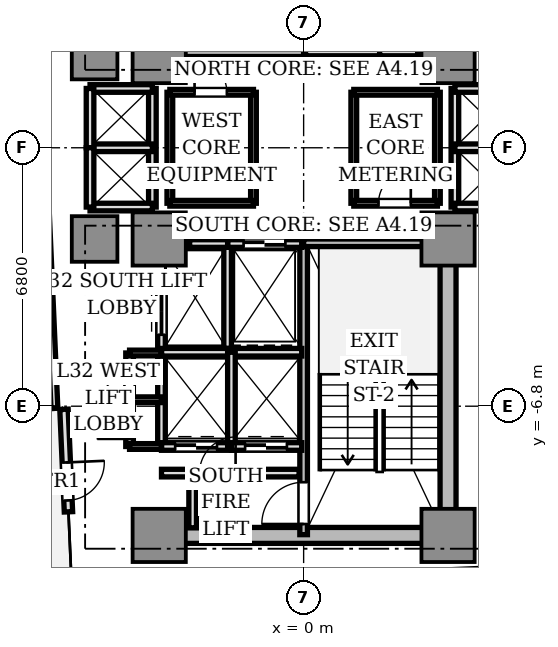
"""IFC4 building model, lengths in metres.
Left out: names, types, materials, properties, quantities, classifications, styles, units other than length and angle.
Written with IfcOpenShell. Run it as: python <this file> out.ifc"""

import sys

from ifc_helpers import new_model, si_unit, direction, frame, frame_2d, origin, origin_2d, place, context, subcontext, project, spatial, rectangle, extrude, source, transform, mapped, element, fill, save


model = new_model("IFC4")
c1 = context("Model", 3, precision=1e-05, world=origin(), true_north=direction((0.0, 1.0)))
c2 = subcontext(c1, "Body", "Model", "MODEL_VIEW")
j1 = project(units=[si_unit("LENGTHUNIT", "METRE"), si_unit("PLANEANGLEUNIT", "RADIAN")], contexts=[c1])
p1 = place(None, origin())
s1 = spatial("IfcSite", under=j1, at=p1, CompositionType="ELEMENT")
p2 = place(p1, origin())
s2 = spatial("IfcBuilding", under=s1, at=p2, CompositionType="ELEMENT")
p3 = place(p2, frame((0.0, 0.0, 118.15)))
s3 = spatial("IfcBuildingStorey", under=s2, at=p3, CompositionType="ELEMENT", Elevation=118.15)
p4 = place(p3, frame((-3.55, -10.2, 0.0), z_axis=(0.0, 0.0, 1.0), x_axis=(1.0, 0.0, 0.0)))
e1 = element("IfcWall", 1, at=p4, inside=s3, PredefinedType="SHEAR", context=c2, shape_type="SweptSolid", body=[
    extrude(rectangle(XDim=7.1, YDim=0.42, at=frame_2d((3.55, 0.0))), origin(), (0.0, 0.0, 1.0), 3.11),
])
p5 = place(p3, frame((3.8, -9.75, 0.0), z_axis=(0.0, 0.0, 1.0), x_axis=(0.0, 1.0, 0.0)))
e2 = element("IfcWall", 2, at=p5, inside=s3, PredefinedType="SHEAR", context=c2, shape_type="SweptSolid", body=[
    extrude(rectangle(XDim=6.9, YDim=0.42, at=frame_2d((3.45, 0.0))), origin(), (0.0, 0.0, 1.0), 3.11),
])
m1 = source(origin(), c2, "Body", "SweptSolid", [
    extrude(rectangle(XDim=1.4, YDim=1.4, at=origin_2d()), origin(), (0.0, 0.0, 1.0), 3.11),
])
for number, where, z_axis, x_axis in (
    (3, (-3.8, 2.4, 0.0), (0.0, 0.0, 1.0), (1.0, 0.0, 0.0)),
    (4, (3.8, 2.4, 0.0), (0.0, 0.0, 1.0), (1.0, 0.0, 0.0)),
    (5, (-3.8, -2.4, 0.0), (0.0, 0.0, 1.0), (1.0, 0.0, 0.0)),
    (6, (3.8, -2.4, 0.0), (0.0, 0.0, 1.0), (1.0, 0.0, 0.0)),
    (7, (-3.8, -10.2, 0.0), (0.0, 0.0, 1.0), (1.0, 0.0, 0.0)),
    (8, (3.8, -10.2, 0.0), (0.0, 0.0, 1.0), (1.0, 0.0, 0.0)),
):
    element("IfcColumn", number, at=place(p3, frame(where, z_axis=z_axis, x_axis=x_axis)), inside=s3, PredefinedType="COLUMN", context=c2, shape_type="MappedRepresentation", body=[
        mapped(m1, transform((0.0, 0.0, 0.0), scale=1.0)),
    ])
m2 = source(origin(), c2, "Body", "SweptSolid", [
    extrude(rectangle(XDim=1.2, YDim=1.2, at=origin_2d()), origin(), (0.0, 0.0, 1.0), 3.11),
])
for number, where, z_axis, x_axis in (
    (9, (-5.5, 2.4, 0.0), (0.0, 0.0, 1.0), (1.0, 0.0, 0.0)),
    (10, (-5.5, -2.4, 0.0), (0.0, 0.0, 1.0), (1.0, 0.0, 0.0)),
):
    element("IfcColumn", number, at=place(p3, frame(where, z_axis=z_axis, x_axis=x_axis)), inside=s3, PredefinedType="COLUMN", context=c2, shape_type="MappedRepresentation", body=[
        mapped(m2, transform((0.0, 0.0, 0.0), scale=1.0)),
    ])
p6 = place(p3, frame((-6.306, -6.882, 0.0), z_axis=(0.0, 0.0, 1.0), x_axis=(0.043672655174, -0.999045894436, 0.0)))
e11 = element("IfcWall", 11, at=p6, inside=s3, PredefinedType="STANDARD", context=c2, shape_type="SweptSolid", body=[
    extrude(rectangle(XDim=2.7, YDim=0.22, at=frame_2d((1.35, 0.0))), origin(), (0.0, 0.0, 1.0), 3.11),
])
p7 = place(p6, frame((1.4, 0.0, 0.0)))
e12 = element("IfcOpeningElement", 12, at=p7, cuts=e11, PredefinedType="OPENING", context=c2, shape_type="SweptSolid", body=[
    extrude(rectangle(XDim=1.0, YDim=2.2, at=frame_2d((0.5, 1.1))), frame((0.0, 0.12, 0.0), z_axis=(0.0, -1.0, 0.0), x_axis=(1.0, 0.0, 0.0)), (0.0, 0.0, 1.0), 0.24),
])
p8 = place(p3, frame((0.0, 2.5, 0.0), z_axis=(0.0, 0.0, 1.0), x_axis=(0.0, 1.0, 0.0)))
e13 = element("IfcWall", 13, at=p8, inside=s3, PredefinedType="SOLIDWALL", context=c2, shape_type="SweptSolid", body=[
    extrude(rectangle(XDim=7.68, YDim=0.2, at=frame_2d((3.84, 0.0))), origin(), (0.0, 0.0, 1.0), 3.11),
])
p9 = place(p8, frame((6.36, 0.0, 0.0)))
e14 = element("IfcOpeningElement", 14, at=p9, cuts=e13, PredefinedType="OPENING", context=c2, shape_type="SweptSolid", body=[
    extrude(rectangle(XDim=1.1, YDim=2.15, at=frame_2d((0.55, 1.075))), frame((0.0, 0.11, 0.0), z_axis=(0.0, -1.0, 0.0), x_axis=(1.0, 0.0, 0.0)), (0.0, 0.0, 1.0), 0.22),
])
p10 = place(p3, frame((-3.72, 2.5, 0.0), z_axis=(0.0, 0.0, 1.0), x_axis=(1.0, 0.0, 0.0)))
e15 = element("IfcWall", 15, at=p10, inside=s3, PredefinedType="SOLIDWALL", context=c2, shape_type="SweptSolid", body=[
    extrude(rectangle(XDim=3.72, YDim=0.2, at=frame_2d((1.86, 0.0))), origin(), (0.0, 0.0, 1.0), 3.11),
])
p11 = place(p3, frame((0.0, -10.18, 0.0), z_axis=(0.0, 0.0, 1.0), x_axis=(0.0, 1.0, 0.0)))
e16 = element("IfcWall", 16, at=p11, inside=s3, PredefinedType="SOLIDWALL", context=c2, shape_type="SweptSolid", body=[
    extrude(rectangle(XDim=7.68, YDim=0.2, at=frame_2d((3.84, 0.0))), origin(), (0.0, 0.0, 1.0), 3.11),
])
p12 = place(p11, frame((0.28, 0.0, 0.0)))
e17 = element("IfcOpeningElement", 17, at=p12, cuts=e16, PredefinedType="OPENING", context=c2, shape_type="SweptSolid", body=[
    extrude(rectangle(XDim=1.1, YDim=2.15, at=frame_2d((0.55, 1.075))), frame((0.0, 0.11, 0.0), z_axis=(0.0, -1.0, 0.0), x_axis=(1.0, 0.0, 0.0)), (0.0, 0.0, 1.0), 0.22),
])
p13 = place(p3, frame((0.0, -2.5, 0.0), z_axis=(0.0, 0.0, 1.0), x_axis=(1.0, 0.0, 0.0)))
e18 = element("IfcWall", 18, at=p13, inside=s3, PredefinedType="SOLIDWALL", context=c2, shape_type="SweptSolid", body=[
    extrude(rectangle(XDim=3.72, YDim=0.2, at=frame_2d((1.86, 0.0))), origin(), (0.0, 0.0, 1.0), 3.11),
])
p14 = place(p3, frame((2.0, 2.5, 0.0), z_axis=(0.0, 0.0, 1.0), x_axis=(0.0, 1.0, 0.0)))
e19 = element("IfcWall", 19, at=p14, inside=s3, PredefinedType="SOLIDWALL", context=c2, shape_type="SweptSolid", body=[
    extrude(rectangle(XDim=2.78, YDim=0.2, at=frame_2d((1.39, 0.0))), origin(), (0.0, 0.0, 1.0), 2.66),
])
p15 = place(p3, frame((0.05, 2.52, 0.0), z_axis=(0.0, 0.0, 1.0), x_axis=(1.0, 0.0, 0.0)))
e20 = element("IfcWall", 20, at=p15, inside=s3, PredefinedType="SOLIDWALL", context=c2, shape_type="SweptSolid", body=[
    extrude(rectangle(XDim=1.95, YDim=0.2, at=frame_2d((0.975, 0.0))), origin(), (0.0, 0.0, 1.0), 2.66),
])
p16 = place(p3, frame((-2.0, -5.28, 0.0), z_axis=(0.0, 0.0, 1.0), x_axis=(0.0, 1.0, 0.0)))
e21 = element("IfcWall", 21, at=p16, inside=s3, PredefinedType="SOLIDWALL", context=c2, shape_type="SweptSolid", body=[
    extrude(rectangle(XDim=2.78, YDim=0.2, at=frame_2d((1.39, 0.0))), origin(), (0.0, 0.0, 1.0), 2.66),
])
p17 = place(p3, frame((-2.0, -2.52, 0.0), z_axis=(0.0, 0.0, 1.0), x_axis=(1.0, 0.0, 0.0)))
e22 = element("IfcWall", 22, at=p17, inside=s3, PredefinedType="SOLIDWALL", context=c2, shape_type="SweptSolid", body=[
    extrude(rectangle(XDim=1.95, YDim=0.2, at=frame_2d((0.975, 0.0))), origin(), (0.0, 0.0, 1.0), 2.66),
])
p18 = place(p17, frame((0.42, 0.0, 0.0)))
e23 = element("IfcOpeningElement", 23, at=p18, cuts=e22, PredefinedType="OPENING", context=c2, shape_type="SweptSolid", body=[
    extrude(rectangle(XDim=1.1, YDim=2.2, at=frame_2d((0.55, 1.1))), frame((0.0, 0.11, 0.0), z_axis=(0.0, -1.0, 0.0), x_axis=(1.0, 0.0, 0.0)), (0.0, 0.0, 1.0), 0.22),
])
for number, where, z_axis, x_axis in (
    (24, (2.0, 2.52, 0.0), (0.0, 0.0, 1.0), (1.0, 0.0, 0.0)),
    (25, (-3.0, -2.52, 0.0), (0.0, 0.0, 1.0), (1.0, 0.0, 0.0)),
):
    element("IfcWall", number, at=place(p3, frame(where, z_axis=z_axis, x_axis=x_axis)), inside=s3, PredefinedType="SOLIDWALL", context=c2, shape_type="SweptSolid", body=[
        extrude(rectangle(XDim=1.0, YDim=0.2, at=frame_2d((0.5, 0.0))), origin(), (0.0, 0.0, 1.0), 2.66),
    ])
p19 = place(p3, frame((-3.74, -5.36, 0.0), z_axis=(0.0, 0.0, 1.0), x_axis=(0.0, 1.0, 0.0)))
e26 = element("IfcWall", 26, at=p19, inside=s3, PredefinedType="SOLIDWALL", context=c2, shape_type="SweptSolid", body=[
    extrude(rectangle(XDim=2.08, YDim=0.2, at=frame_2d((1.04, 0.0))), origin(), (0.0, 0.0, 1.0), 2.66),
])
p20 = place(p19, frame((0.44, 0.0, 0.0)))
e27 = element("IfcOpeningElement", 27, at=p20, cuts=e26, PredefinedType="OPENING", context=c2, shape_type="SweptSolid", body=[
    extrude(rectangle(XDim=1.2, YDim=2.2, at=frame_2d((0.6, 1.1))), frame((0.0, 0.11, 0.0), z_axis=(0.0, -1.0, 0.0), x_axis=(1.0, 0.0, 0.0)), (0.0, 0.0, 1.0), 0.22),
])
p21 = place(p3, frame((-3.74, -7.86, 0.0), z_axis=(0.0, 0.0, 1.0), x_axis=(0.0, 1.0, 0.0)))
e28 = element("IfcWall", 28, at=p21, inside=s3, PredefinedType="SOLIDWALL", context=c2, shape_type="SweptSolid", body=[
    extrude(rectangle(XDim=2.48, YDim=0.2, at=frame_2d((1.24, 0.0))), origin(), (0.0, 0.0, 1.0), 2.66),
])
p22 = place(p3, frame((-3.74, -7.86, 0.0), z_axis=(0.0, 0.0, 1.0), x_axis=(1.0, 0.0, 0.0)))
e29 = element("IfcWall", 29, at=p22, inside=s3, PredefinedType="SOLIDWALL", context=c2, shape_type="SweptSolid", body=[
    extrude(rectangle(XDim=1.84, YDim=0.2, at=frame_2d((0.92, 0.0))), origin(), (0.0, 0.0, 1.0), 2.66),
])
p23 = place(p22, frame((0.36, 0.0, 0.0)))
e30 = element("IfcOpeningElement", 30, at=p23, cuts=e29, PredefinedType="OPENING", context=c2, shape_type="SweptSolid", body=[
    extrude(rectangle(XDim=1.1, YDim=2.2, at=frame_2d((0.55, 1.1))), frame((0.0, 0.11, 0.0), z_axis=(0.0, -1.0, 0.0), x_axis=(1.0, 0.0, 0.0)), (0.0, 0.0, 1.0), 0.22),
])
p24 = place(p3, frame((-3.74, -5.38, 0.0), z_axis=(0.0, 0.0, 1.0), x_axis=(1.0, 0.0, 0.0)))
e31 = element("IfcWall", 31, at=p24, inside=s3, PredefinedType="SOLIDWALL", context=c2, shape_type="SweptSolid", body=[
    extrude(rectangle(XDim=3.69, YDim=0.2, at=frame_2d((1.845, 0.0))), origin(), (0.0, 0.0, 1.0), 2.66),
])
p25 = place(p3, frame((-1.9, -7.86, 0.0), z_axis=(0.0, 0.0, 1.0), x_axis=(0.0, 1.0, 0.0)))
e32 = element("IfcWall", 32, at=p25, inside=s3, PredefinedType="SOLIDWALL", context=c2, shape_type="SweptSolid", body=[
    extrude(rectangle(XDim=2.48, YDim=0.2, at=frame_2d((1.24, 0.0))), origin(), (0.0, 0.0, 1.0), 2.66),
])
p26 = place(p3, frame((-1.9, -7.86, 0.0), z_axis=(0.0, 0.0, 1.0), x_axis=(1.0, 0.0, 0.0)))
e33 = element("IfcWall", 33, at=p26, inside=s3, PredefinedType="SOLIDWALL", context=c2, shape_type="SweptSolid", body=[
    extrude(rectangle(XDim=1.85, YDim=0.2, at=frame_2d((0.925, 0.0))), origin(), (0.0, 0.0, 1.0), 2.66),
])
p27 = place(p26, frame((0.36, 0.0, 0.0)))
e34 = element("IfcOpeningElement", 34, at=p27, cuts=e33, PredefinedType="OPENING", context=c2, shape_type="SweptSolid", body=[
    extrude(rectangle(XDim=1.1, YDim=2.2, at=frame_2d((0.55, 1.1))), frame((0.0, 0.11, 0.0), z_axis=(0.0, -1.0, 0.0), x_axis=(1.0, 0.0, 0.0)), (0.0, 0.0, 1.0), 0.22),
])
p28 = place(p3, frame((3.98, -1.56, 0.0), z_axis=(0.0, 0.0, 1.0), x_axis=(0.0, 1.0, 0.0)))
e35 = element("IfcWall", 35, at=p28, inside=s3, PredefinedType="SOLIDWALL", context=c2, shape_type="SweptSolid", body=[
    extrude(rectangle(XDim=3.12, YDim=0.2, at=frame_2d((1.56, 0.0))), origin(), (0.0, 0.0, 1.0), 2.28),
])
for number, where, z_axis, x_axis in (
    (36, (3.98, 1.56, 0.0), (0.0, 0.0, 1.0), (1.0, 0.0, 0.0)),
    (37, (3.98, -1.56, 0.0), (0.0, 0.0, 1.0), (1.0, 0.0, 0.0)),
    (38, (3.98, 0.0, 0.0), (0.0, 0.0, 1.0), (1.0, 0.0, 0.0)),
):
    element("IfcWall", number, at=place(p3, frame(where, z_axis=z_axis, x_axis=x_axis)), inside=s3, PredefinedType="SOLIDWALL", context=c2, shape_type="SweptSolid", body=[
        extrude(rectangle(XDim=1.64, YDim=0.2, at=frame_2d((0.82, 0.0))), origin(), (0.0, 0.0, 1.0), 2.66),
    ])
p29 = place(p3, frame((-3.98, -1.56, 0.0), z_axis=(0.0, 0.0, 1.0), x_axis=(0.0, 1.0, 0.0)))
e39 = element("IfcWall", 39, at=p29, inside=s3, PredefinedType="SOLIDWALL", context=c2, shape_type="SweptSolid", body=[
    extrude(rectangle(XDim=3.12, YDim=0.2, at=frame_2d((1.56, 0.0))), origin(), (0.0, 0.0, 1.0), 2.28),
])
for number, where, z_axis, x_axis in (
    (40, (-5.62, 1.56, 0.0), (0.0, 0.0, 1.0), (1.0, 0.0, 0.0)),
    (41, (-5.62, -1.56, 0.0), (0.0, 0.0, 1.0), (1.0, 0.0, 0.0)),
    (42, (-5.62, 0.0, 0.0), (0.0, 0.0, 1.0), (1.0, 0.0, 0.0)),
):
    element("IfcWall", number, at=place(p3, frame(where, z_axis=z_axis, x_axis=x_axis)), inside=s3, PredefinedType="SOLIDWALL", context=c2, shape_type="SweptSolid", body=[
        extrude(rectangle(XDim=1.64, YDim=0.2, at=frame_2d((0.82, 0.0))), origin(), (0.0, 0.0, 1.0), 2.66),
    ])
for number, where, z_axis, x_axis in (
    (43, (-5.62, 0.0, 0.0), (0.0, 0.0, 1.0), (0.0, 1.0, 0.0)),
    (44, (-5.62, -1.56, 0.0), (0.0, 0.0, 1.0), (0.0, 1.0, 0.0)),
):
    element("IfcWall", number, at=place(p3, frame(where, z_axis=z_axis, x_axis=x_axis)), inside=s3, PredefinedType="SOLIDWALL", context=c2, shape_type="SweptSolid", body=[
        extrude(rectangle(XDim=1.56, YDim=0.2, at=frame_2d((0.78, 0.0))), origin(), (0.0, 0.0, 1.0), 2.66),
    ])
p30 = place(p3, frame((-3.74, -8.56, 0.0), z_axis=(0.0, 0.0, 1.0), x_axis=(1.0, 0.0, 0.0)))
e45 = element("IfcWall", 45, at=p30, inside=s3, PredefinedType="SOLIDWALL", context=c2, shape_type="SweptSolid", body=[
    extrude(rectangle(XDim=3.62, YDim=0.2, at=frame_2d((1.81, 0.0))), origin(), (0.0, 0.0, 1.0), 2.66),
])
p31 = place(p30, frame((1.0, 0.0, 0.0)))
e46 = element("IfcOpeningElement", 46, at=p31, cuts=e45, PredefinedType="OPENING", context=c2, shape_type="SweptSolid", body=[
    extrude(rectangle(XDim=0.95, YDim=2.15, at=frame_2d((0.475, 1.075))), frame((0.0, 0.11, 0.0), z_axis=(0.0, -1.0, 0.0), x_axis=(1.0, 0.0, 0.0)), (0.0, 0.0, 1.0), 0.22),
])
p32 = place(p3, frame((-2.92, -10.0, 0.0), z_axis=(0.0, 0.0, 1.0), x_axis=(0.0, 1.0, 0.0)))
e47 = element("IfcWall", 47, at=p32, inside=s3, PredefinedType="SOLIDWALL", context=c2, shape_type="SweptSolid", body=[
    extrude(rectangle(XDim=1.44, YDim=0.2, at=frame_2d((0.72, 0.0))), origin(), (0.0, 0.0, 1.0), 2.66),
])
p33 = place(p3, frame((-4.58, -7.86, 0.0), z_axis=(0.0, 0.0, 1.0), x_axis=(0.0, 1.0, 0.0)))
e48 = element("IfcWall", 48, at=p33, inside=s3, PredefinedType="SOLIDWALL", context=c2, shape_type="SweptSolid", body=[
    extrude(rectangle(XDim=2.46, YDim=0.2, at=frame_2d((1.23, 0.0))), origin(), (0.0, 0.0, 1.0), 2.66),
])
p34 = place(p33, frame((0.2, 0.0, 0.0)))
e49 = element("IfcOpeningElement", 49, at=p34, cuts=e48, PredefinedType="OPENING", context=c2, shape_type="SweptSolid", body=[
    extrude(rectangle(XDim=0.85, YDim=2.1, at=frame_2d((0.425, 1.05))), frame((0.0, 0.11, 0.0), z_axis=(0.0, -1.0, 0.0), x_axis=(1.0, 0.0, 0.0)), (0.0, 0.0, 1.0), 0.22),
])
p35 = place(p33, frame((1.38, 0.0, 0.0)))
e50 = element("IfcOpeningElement", 50, at=p35, cuts=e48, PredefinedType="OPENING", context=c2, shape_type="SweptSolid", body=[
    extrude(rectangle(XDim=0.85, YDim=2.1, at=frame_2d((0.425, 1.05))), frame((0.0, 0.11, 0.0), z_axis=(0.0, -1.0, 0.0), x_axis=(1.0, 0.0, 0.0)), (0.0, 0.0, 1.0), 0.22),
])
for number, where, z_axis, x_axis in (
    (51, (-4.58, -5.4, 0.0), (0.0, 0.0, 1.0), (1.0, 0.0, 0.0)),
    (52, (-4.58, -7.86, 0.0), (0.0, 0.0, 1.0), (1.0, 0.0, 0.0)),
    (53, (-4.58, -6.63, 0.0), (0.0, 0.0, 1.0), (1.0, 0.0, 0.0)),
):
    element("IfcWall", number, at=place(p3, frame(where, z_axis=z_axis, x_axis=x_axis)), inside=s3, PredefinedType="PARTITIONING", context=c2, shape_type="SweptSolid", body=[
        extrude(rectangle(XDim=0.84, YDim=0.15, at=frame_2d((0.42, 0.0))), origin(), (0.0, 0.0, 1.0), 2.66),
    ])
p36 = place(p3, frame((-1.32, -1.46, 0.0), z_axis=(0.0, 0.0, 1.0), x_axis=(0.0, 1.0, 0.0)))
e54 = element("IfcWall", 54, at=p36, inside=s3, PredefinedType="PARTITIONING", context=c2, shape_type="SweptSolid", body=[
    extrude(rectangle(XDim=2.92, YDim=0.15, at=frame_2d((1.46, 0.0))), origin(), (0.0, 0.0, 1.0), 2.66),
])
p37 = place(p3, frame((-3.52, -1.46, 0.0), z_axis=(0.0, 0.0, 1.0), x_axis=(0.0, 1.0, 0.0)))
e55 = element("IfcWall", 55, at=p37, inside=s3, PredefinedType="PARTITIONING", context=c2, shape_type="SweptSolid", body=[
    extrude(rectangle(XDim=2.92, YDim=0.15, at=frame_2d((1.46, 0.0))), origin(), (0.0, 0.0, 1.0), 2.28),
])
p38 = place(p3, frame((-3.52, 1.46, 0.0), z_axis=(0.0, 0.0, 1.0), x_axis=(1.0, 0.0, 0.0)))
e56 = element("IfcWall", 56, at=p38, inside=s3, PredefinedType="PARTITIONING", context=c2, shape_type="SweptSolid", body=[
    extrude(rectangle(XDim=2.2, YDim=0.15, at=frame_2d((1.1, 0.0))), origin(), (0.0, 0.0, 1.0), 2.66),
])
p39 = place(p38, frame((0.65, 0.0, 0.0)))
e57 = element("IfcOpeningElement", 57, at=p39, cuts=e56, PredefinedType="OPENING", context=c2, shape_type="SweptSolid", body=[
    extrude(rectangle(XDim=0.85, YDim=2.1, at=frame_2d((0.425, 1.05))), frame((0.0, 0.085, 0.0), z_axis=(0.0, -1.0, 0.0), x_axis=(1.0, 0.0, 0.0)), (0.0, 0.0, 1.0), 0.17),
])
p40 = place(p3, frame((-3.52, -1.46, 0.0), z_axis=(0.0, 0.0, 1.0), x_axis=(1.0, 0.0, 0.0)))
e58 = element("IfcWall", 58, at=p40, inside=s3, PredefinedType="PARTITIONING", context=c2, shape_type="SweptSolid", body=[
    extrude(rectangle(XDim=2.2, YDim=0.15, at=frame_2d((1.1, 0.0))), origin(), (0.0, 0.0, 1.0), 2.66),
])
p41 = place(p3, frame((1.32, -1.46, 0.0), z_axis=(0.0, 0.0, 1.0), x_axis=(0.0, 1.0, 0.0)))
e59 = element("IfcWall", 59, at=p41, inside=s3, PredefinedType="PARTITIONING", context=c2, shape_type="SweptSolid", body=[
    extrude(rectangle(XDim=2.92, YDim=0.15, at=frame_2d((1.46, 0.0))), origin(), (0.0, 0.0, 1.0), 2.66),
])
p42 = place(p3, frame((3.52, -1.46, 0.0), z_axis=(0.0, 0.0, 1.0), x_axis=(0.0, 1.0, 0.0)))
e60 = element("IfcWall", 60, at=p42, inside=s3, PredefinedType="PARTITIONING", context=c2, shape_type="SweptSolid", body=[
    extrude(rectangle(XDim=2.92, YDim=0.15, at=frame_2d((1.46, 0.0))), origin(), (0.0, 0.0, 1.0), 2.28),
])
p43 = place(p3, frame((1.32, 1.46, 0.0), z_axis=(0.0, 0.0, 1.0), x_axis=(1.0, 0.0, 0.0)))
e61 = element("IfcWall", 61, at=p43, inside=s3, PredefinedType="PARTITIONING", context=c2, shape_type="SweptSolid", body=[
    extrude(rectangle(XDim=2.2, YDim=0.15, at=frame_2d((1.1, 0.0))), origin(), (0.0, 0.0, 1.0), 2.66),
])
p44 = place(p3, frame((1.32, -1.46, 0.0), z_axis=(0.0, 0.0, 1.0), x_axis=(1.0, 0.0, 0.0)))
e62 = element("IfcWall", 62, at=p44, inside=s3, PredefinedType="PARTITIONING", context=c2, shape_type="SweptSolid", body=[
    extrude(rectangle(XDim=2.2, YDim=0.15, at=frame_2d((1.1, 0.0))), origin(), (0.0, 0.0, 1.0), 2.66),
])
p45 = place(p44, frame((0.65, 0.0, 0.0)))
e63 = element("IfcOpeningElement", 63, at=p45, cuts=e62, PredefinedType="OPENING", context=c2, shape_type="SweptSolid", body=[
    extrude(rectangle(XDim=0.85, YDim=2.1, at=frame_2d((0.425, 1.05))), frame((0.0, 0.085, 0.0), z_axis=(0.0, -1.0, 0.0), x_axis=(1.0, 0.0, 0.0)), (0.0, 0.0, 1.0), 0.17),
])
p46 = place(p3, frame((-6.8, -1.298, 0.0), z_axis=(0.0, 0.0, 1.0), x_axis=(0.04359376056, -0.999049340143, 0.0)))
e64 = element("IfcWall", 64, at=p46, inside=s3, PredefinedType="PARTITIONING", context=c2, shape_type="SweptSolid", body=[
    extrude(rectangle(XDim=5.55, YDim=0.18, at=frame_2d((2.775, 0.0))), origin(), (0.0, 0.0, 1.0), 2.66),
])
p47 = place(p3, frame((3.542, -11.206, 0.0), z_axis=(0.0, 0.0, 1.0), x_axis=(0.999046129111, 0.04366728647, 0.0)))
e65 = element("IfcWall", 65, at=p47, inside=s3, PredefinedType="PARTITIONING", context=c2, shape_type="SweptSolid", body=[
    extrude(rectangle(XDim=3.5, YDim=0.18, at=frame_2d((1.75, 0.0))), origin(), (0.0, 0.0, 1.0), 2.66),
])
m3 = source(origin(), c2, "Body", "SweptSolid", [
    extrude(rectangle(XDim=1.0, YDim=0.05, at=origin_2d()), origin(), (0.0, 0.0, 1.0), 2.2),
])
p48 = place(p7, frame((0.5, 0.0, 0.0)))
e66 = element("IfcDoor", 66, at=p48, inside=s3, OperationType="SINGLE_SWING_LEFT", PredefinedType="DOOR", context=c2, shape_type="MappedRepresentation", body=[
    mapped(m3, transform((0.0, 0.0, 0.0), scale=1.0)),
])
fill(e12, e66)
m4 = source(origin(), c2, "Body", "SweptSolid", [
    extrude(rectangle(XDim=1.1, YDim=0.05, at=origin_2d()), origin(), (0.0, 0.0, 1.0), 2.2),
])
p49 = place(p18, frame((0.55, 0.0, 0.0)))
e67 = element("IfcDoor", 67, at=p49, inside=s3, OperationType="DOUBLE_DOOR_SLIDING", PredefinedType="DOOR", context=c2, shape_type="MappedRepresentation", body=[
    mapped(m4, transform((0.0, 0.0, 0.0), scale=1.0)),
])
fill(e23, e67)
m5 = source(origin(), c2, "Body", "SweptSolid", [
    extrude(rectangle(XDim=1.2, YDim=0.05, at=origin_2d()), origin(), (0.0, 0.0, 1.0), 2.2),
])
p50 = place(p20, frame((0.6, 0.0, 0.0)))
e68 = element("IfcDoor", 68, at=p50, inside=s3, OperationType="DOUBLE_DOOR_SLIDING", PredefinedType="DOOR", context=c2, shape_type="MappedRepresentation", body=[
    mapped(m5, transform((0.0, 0.0, 0.0), scale=1.0)),
])
fill(e27, e68)
p51 = place(p23, frame((0.55, 0.0, 0.0)))
e69 = element("IfcDoor", 69, at=p51, inside=s3, OperationType="DOUBLE_DOOR_SLIDING", PredefinedType="DOOR", context=c2, shape_type="MappedRepresentation", body=[
    mapped(m4, transform((0.0, 0.0, 0.0), scale=1.0)),
])
fill(e30, e69)
p52 = place(p27, frame((0.55, 0.0, 0.0)))
e70 = element("IfcDoor", 70, at=p52, inside=s3, OperationType="DOUBLE_DOOR_SLIDING", PredefinedType="DOOR", context=c2, shape_type="MappedRepresentation", body=[
    mapped(m4, transform((0.0, 0.0, 0.0), scale=1.0)),
])
fill(e34, e70)
m6 = source(origin(), c2, "Body", "SweptSolid", [
    extrude(rectangle(XDim=1.1, YDim=0.05, at=origin_2d()), origin(), (0.0, 0.0, 1.0), 2.15),
])
p53 = place(p12, frame((0.55, 0.0, 0.0)))
e71 = element("IfcDoor", 71, at=p53, inside=s3, OperationType="SINGLE_SWING_LEFT", PredefinedType="DOOR", context=c2, shape_type="MappedRepresentation", body=[
    mapped(m6, transform((0.0, 0.0, 0.0), scale=1.0)),
])
fill(e17, e71)
m7 = source(origin(), c2, "Body", "SweptSolid", [
    extrude(rectangle(XDim=0.95, YDim=0.05, at=origin_2d()), origin(), (0.0, 0.0, 1.0), 2.15),
])
p54 = place(p31, frame((0.475, 0.0, 0.0)))
e72 = element("IfcDoor", 72, at=p54, inside=s3, OperationType="SINGLE_SWING_RIGHT", PredefinedType="DOOR", context=c2, shape_type="MappedRepresentation", body=[
    mapped(m7, transform((0.0, 0.0, 0.0), scale=1.0)),
])
fill(e46, e72)
m8 = source(origin(), c2, "Body", "SweptSolid", [
    extrude(rectangle(XDim=0.85, YDim=0.05, at=origin_2d()), origin(), (0.0, 0.0, 1.0), 2.1),
])
p55 = place(p34, frame((0.425, 0.0, 0.0)))
e73 = element("IfcDoor", 73, at=p55, inside=s3, OperationType="SINGLE_SWING_LEFT", PredefinedType="DOOR", context=c2, shape_type="MappedRepresentation", body=[
    mapped(m8, transform((0.0, 0.0, 0.0), scale=1.0)),
])
fill(e49, e73)
p56 = place(p35, frame((0.425, 0.0, 0.0)))
e74 = element("IfcDoor", 74, at=p56, inside=s3, OperationType="SINGLE_SWING_RIGHT", PredefinedType="DOOR", context=c2, shape_type="MappedRepresentation", body=[
    mapped(m8, transform((0.0, 0.0, 0.0), scale=1.0)),
])
fill(e50, e74)
p57 = place(p39, frame((0.425, 0.0, 0.0)))
e75 = element("IfcDoor", 75, at=p57, inside=s3, OperationType="SINGLE_SWING_LEFT", PredefinedType="DOOR", context=c2, shape_type="MappedRepresentation", body=[
    mapped(m8, transform((0.0, 0.0, 0.0), scale=1.0)),
])
fill(e57, e75)
p58 = place(p45, frame((0.425, 0.0, 0.0)))
e76 = element("IfcDoor", 76, at=p58, inside=s3, OperationType="SINGLE_SWING_RIGHT", PredefinedType="DOOR", context=c2, shape_type="MappedRepresentation", body=[
    mapped(m8, transform((0.0, 0.0, 0.0), scale=1.0)),
])
fill(e63, e76)
save(model, sys.argv[1])
